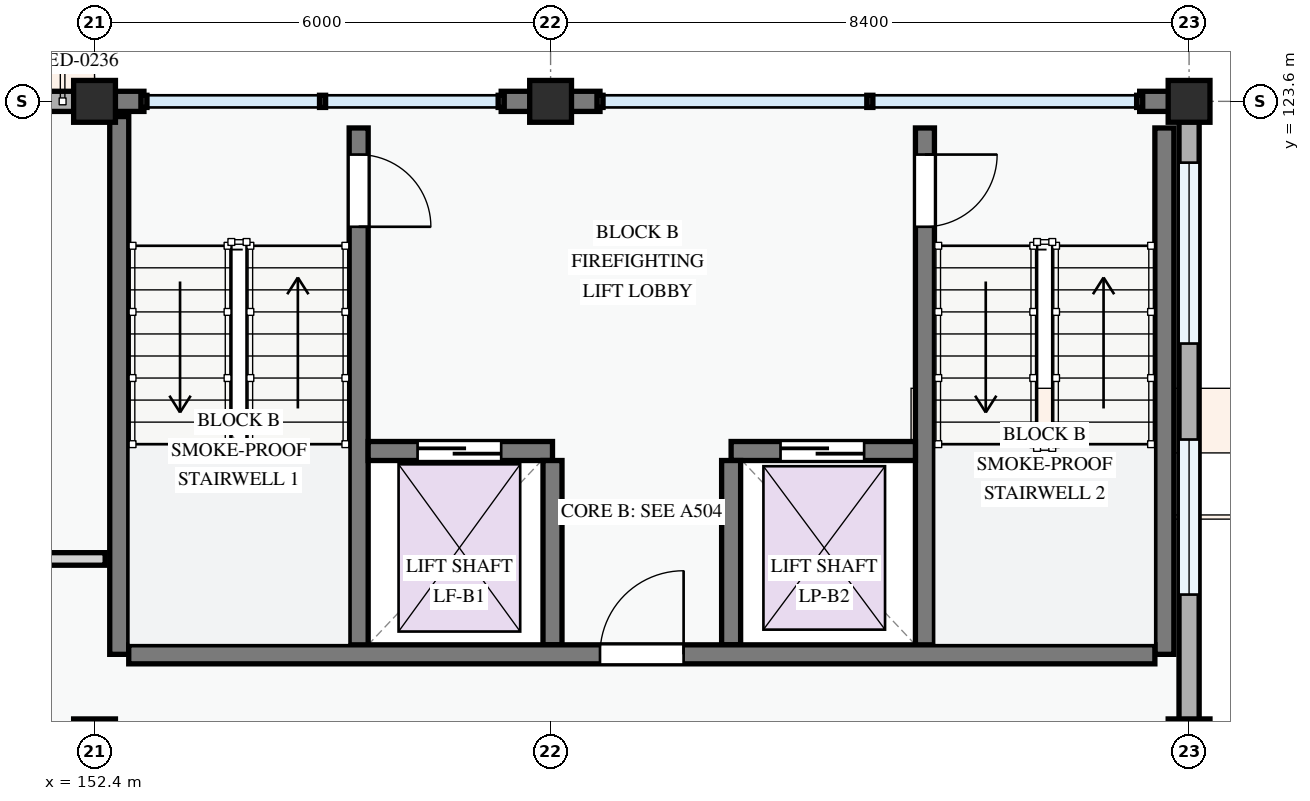
"""IFC4 building model, lengths in metres.
Left out: names, types, materials, properties, quantities, classifications, styles, units other than length and angle.
Written with IfcOpenShell. Run it as: python <this file> out.ifc"""

import sys

from ifc_helpers import new_model, si_unit, direction, frame, frame_2d, origin, origin_2d, place, context, subcontext, project, spatial, rectangle, extrude, element, fill, save


model = new_model("IFC4")
c1 = context("Model", 3, precision=1e-05, world=origin(), true_north=direction((0.0, 1.0)))
c2 = subcontext(c1, "Body", "Model", "MODEL_VIEW")
j1 = project(units=[si_unit("LENGTHUNIT", "METRE"), si_unit("PLANEANGLEUNIT", "RADIAN")], contexts=[c1])
p1 = place(None, origin())
s1 = spatial("IfcSite", under=j1, at=p1, CompositionType="ELEMENT")
p2 = place(p1, origin())
s2 = spatial("IfcBuilding", under=s1, at=p2, CompositionType="ELEMENT")
p3 = place(p2, frame((0.0, 0.0, 31.2)))
s3 = spatial("IfcBuildingStorey", under=s2, at=p3, CompositionType="ELEMENT", Elevation=31.2)
for number, where, z_axis, x_axis in (
    (1, (152.4, 115.2, 0.0), (0.0, 0.0, 1.0), (1.0, 0.0, 0.0)),
    (2, (152.4, 123.6, 0.0), (0.0, 0.0, 1.0), (1.0, 0.0, 0.0)),
    (3, (158.4, 123.6, 0.0), (0.0, 0.0, 1.0), (1.0, 0.0, 0.0)),
    (4, (166.8, 115.2, 0.0), (0.0, 0.0, 1.0), (1.0, 0.0, 0.0)),
    (5, (166.8, 123.6, 0.0), (0.0, 0.0, 1.0), (1.0, 0.0, 0.0)),
):
    element("IfcColumn", number, at=place(p3, frame(where, z_axis=z_axis, x_axis=x_axis)), inside=s3, PredefinedType="COLUMN", context=c2, shape_type="SweptSolid", body=[
        extrude(rectangle(XDim=0.55, YDim=0.55, at=origin_2d()), origin(), (0.0, 0.0, 1.0), 3.3),
    ])
p4 = place(p3, frame((166.8, 115.2, 0.0), z_axis=(0.0, 0.0, 1.0), x_axis=(0.0, 1.0, 0.0)))
e6 = element("IfcWall", 6, at=p4, inside=s3, PredefinedType="STANDARD", context=c2, shape_type="SweptSolid", body=[
    extrude(rectangle(XDim=8.4, YDim=0.265, at=frame_2d((4.2, 0.0))), origin(), (0.0, 0.0, 1.0), 2.425),
])
p5 = place(p4, frame((1.911, 0.0, 0.78)))
e7 = element("IfcOpeningElement", 7, at=p5, cuts=e6, PredefinedType="OPENING", context=c2, shape_type="SweptSolid", body=[
    extrude(rectangle(XDim=2.04, YDim=1.46, at=frame_2d((1.02, 0.73))), frame((0.0, 0.143, 0.0), z_axis=(0.0, -1.0, 0.0), x_axis=(1.0, 0.0, 0.0)), (0.0, 0.0, 1.0), 0.285),
])
p6 = place(p4, frame((5.214, 0.0, 0.78)))
e8 = element("IfcOpeningElement", 8, at=p6, cuts=e6, PredefinedType="OPENING", context=c2, shape_type="SweptSolid", body=[
    extrude(rectangle(XDim=2.38, YDim=1.48, at=frame_2d((1.19, 0.74))), frame((0.0, 0.143, 0.0), z_axis=(0.0, -1.0, 0.0), x_axis=(1.0, 0.0, 0.0)), (0.0, 0.0, 1.0), 0.285),
])
p7 = place(p3, frame((166.666, 123.6, 0.0), z_axis=(0.0, 0.0, 1.0), x_axis=(-1.0, 0.0, 0.0)))
e9 = element("IfcWall", 9, at=p7, inside=s3, PredefinedType="STANDARD", context=c2, shape_type="SweptSolid", body=[
    extrude(rectangle(XDim=0.516, YDim=0.265, at=frame_2d((0.258, 0.0))), origin(), (0.0, 0.0, 1.0), 3.04),
])
p8 = place(p3, frame((159.05, 123.6, 0.0), z_axis=(0.0, 0.0, 1.0), x_axis=(-1.0, 0.0, 0.0)))
e10 = element("IfcWall", 10, at=p8, inside=s3, PredefinedType="STANDARD", context=c2, shape_type="SweptSolid", body=[
    extrude(rectangle(XDim=0.65, YDim=0.265, at=frame_2d((0.325, 0.0))), origin(), (0.0, 0.0, 1.0), 3.04),
])
p9 = place(p3, frame((158.4, 123.6, 0.0), z_axis=(0.0, 0.0, 1.0), x_axis=(-1.0, 0.0, 0.0)))
e11 = element("IfcWall", 11, at=p9, inside=s3, PredefinedType="STANDARD", context=c2, shape_type="SweptSolid", body=[
    extrude(rectangle(XDim=0.65, YDim=0.265, at=frame_2d((0.325, 0.0))), origin(), (0.0, 0.0, 1.0), 3.04),
])
p10 = place(p3, frame((153.05, 123.6, 0.0), z_axis=(0.0, 0.0, 1.0), x_axis=(-1.0, 0.0, 0.0)))
e12 = element("IfcWall", 12, at=p10, inside=s3, PredefinedType="STANDARD", context=c2, shape_type="SweptSolid", body=[
    extrude(rectangle(XDim=0.65, YDim=0.265, at=frame_2d((0.325, 0.0))), origin(), (0.0, 0.0, 1.0), 3.04),
])
p11 = place(p3, frame((152.4, 123.6, 0.0), z_axis=(0.0, 0.0, 1.0), x_axis=(-1.0, 0.0, 0.0)))
e13 = element("IfcWall", 13, at=p11, inside=s3, PredefinedType="STANDARD", context=c2, shape_type="SweptSolid", body=[
    extrude(rectangle(XDim=8.4, YDim=0.265, at=frame_2d((4.2, 0.0))), origin(), (0.0, 0.0, 1.0), 2.375),
])
p12 = place(p11, frame((0.62, 0.0, 0.0)))
e14 = element("IfcOpeningElement", 14, at=p12, cuts=e13, PredefinedType="OPENING", context=c2, shape_type="SweptSolid", body=[
    extrude(rectangle(XDim=1.1, YDim=2.15, at=frame_2d((0.55, 1.075))), frame((0.0, 0.143, 0.0), z_axis=(0.0, -1.0, 0.0), x_axis=(1.0, 0.0, 0.0)), (0.0, 0.0, 1.0), 0.285),
])
p13 = place(p11, frame((2.175, 0.0, 0.78)))
e15 = element("IfcOpeningElement", 15, at=p13, cuts=e13, PredefinedType="OPENING", context=c2, shape_type="SweptSolid", body=[
    extrude(rectangle(XDim=2.48, YDim=1.46, at=frame_2d((1.24, 0.73))), frame((0.0, 0.143, 0.0), z_axis=(0.0, -1.0, 0.0), x_axis=(1.0, 0.0, 0.0)), (0.0, 0.0, 1.0), 0.285),
])
p14 = place(p11, frame((5.865, 0.0, 0.78)))
e16 = element("IfcOpeningElement", 16, at=p14, cuts=e13, PredefinedType="OPENING", context=c2, shape_type="SweptSolid", body=[
    extrude(rectangle(XDim=1.4, YDim=1.45, at=frame_2d((0.7, 0.725))), frame((0.0, 0.143, 0.0), z_axis=(0.0, -1.0, 0.0), x_axis=(1.0, 0.0, 0.0)), (0.0, 0.0, 1.0), 0.285),
])
p15 = place(p3, frame((155.875, 123.25, 0.0), z_axis=(0.0, 0.0, 1.0), x_axis=(0.0, -1.0, 0.0)))
e17 = element("IfcWall", 17, at=p15, inside=s3, PredefinedType="SHEAR", context=c2, shape_type="SweptSolid", body=[
    extrude(rectangle(XDim=6.925, YDim=0.25, at=frame_2d((3.462, 0.0))), origin(), (0.0, 0.0, 1.0), 3.0),
])
p16 = place(p15, frame((0.35, 0.0, 0.0)))
e18 = element("IfcOpeningElement", 18, at=p16, cuts=e17, PredefinedType="OPENING", context=c2, shape_type="SweptSolid", body=[
    extrude(rectangle(XDim=0.95, YDim=2.1, at=frame_2d((0.475, 1.05))), frame((0.0, 0.135, 0.0), z_axis=(0.0, -1.0, 0.0), x_axis=(1.0, 0.0, 0.0)), (0.0, 0.0, 1.0), 0.27),
])
p17 = place(p3, frame((152.725, 123.4, 0.0), z_axis=(0.0, 0.0, 1.0), x_axis=(0.0, -1.0, 0.0)))
e19 = element("IfcWall", 19, at=p17, inside=s3, PredefinedType="SHEAR", context=c2, shape_type="SweptSolid", body=[
    extrude(rectangle(XDim=7.075, YDim=0.25, at=frame_2d((3.538, 0.0))), origin(), (0.0, 0.0, 1.0), 3.0),
])
p18 = place(p3, frame((166.475, 123.25, 0.0), z_axis=(0.0, 0.0, 1.0), x_axis=(0.0, -1.0, 0.0)))
e20 = element("IfcWall", 20, at=p18, inside=s3, PredefinedType="SHEAR", context=c2, shape_type="SweptSolid", body=[
    extrude(rectangle(XDim=6.925, YDim=0.25, at=frame_2d((3.462, 0.0))), origin(), (0.0, 0.0, 1.0), 3.0),
])
p19 = place(p3, frame((163.325, 123.25, 0.0), z_axis=(0.0, 0.0, 1.0), x_axis=(0.0, -1.0, 0.0)))
e21 = element("IfcWall", 21, at=p19, inside=s3, PredefinedType="SHEAR", context=c2, shape_type="SweptSolid", body=[
    extrude(rectangle(XDim=6.925, YDim=0.25, at=frame_2d((3.462, 0.0))), origin(), (0.0, 0.0, 1.0), 3.0),
])
p20 = place(p19, frame((0.35, 0.0, 0.0)))
e22 = element("IfcOpeningElement", 22, at=p20, cuts=e21, PredefinedType="OPENING", context=c2, shape_type="SweptSolid", body=[
    extrude(rectangle(XDim=0.95, YDim=2.1, at=frame_2d((0.475, 1.05))), frame((0.0, 0.135, 0.0), z_axis=(0.0, -1.0, 0.0), x_axis=(1.0, 0.0, 0.0)), (0.0, 0.0, 1.0), 0.27),
])
p21 = place(p3, frame((156.0, 119.0, 0.0), z_axis=(0.0, 0.0, 1.0), x_axis=(1.0, 0.0, 0.0)))
e23 = element("IfcWall", 23, at=p21, inside=s3, PredefinedType="SHEAR", context=c2, shape_type="SweptSolid", body=[
    extrude(rectangle(XDim=2.425, YDim=0.25, at=frame_2d((1.212, 0.0))), origin(), (0.0, 0.0, 1.0), 3.0),
])
p22 = place(p21, frame((0.65, 0.0, 0.0)))
e24 = element("IfcOpeningElement", 24, at=p22, cuts=e23, PredefinedType="OPENING", context=c2, shape_type="SweptSolid", body=[
    extrude(rectangle(XDim=1.1, YDim=2.15, at=frame_2d((0.55, 1.075))), frame((0.0, 0.135, 0.0), z_axis=(0.0, -1.0, 0.0), x_axis=(1.0, 0.0, 0.0)), (0.0, 0.0, 1.0), 0.27),
])
p23 = place(p3, frame((160.775, 119.0, 0.0), z_axis=(0.0, 0.0, 1.0), x_axis=(1.0, 0.0, 0.0)))
e25 = element("IfcWall", 25, at=p23, inside=s3, PredefinedType="SHEAR", context=c2, shape_type="SweptSolid", body=[
    extrude(rectangle(XDim=2.425, YDim=0.25, at=frame_2d((1.212, 0.0))), origin(), (0.0, 0.0, 1.0), 3.0),
])
p24 = place(p23, frame((0.65, 0.0, 0.0)))
e26 = element("IfcOpeningElement", 26, at=p24, cuts=e25, PredefinedType="OPENING", context=c2, shape_type="SweptSolid", body=[
    extrude(rectangle(XDim=1.1, YDim=2.15, at=frame_2d((0.55, 1.075))), frame((0.0, 0.135, 0.0), z_axis=(0.0, -1.0, 0.0), x_axis=(1.0, 0.0, 0.0)), (0.0, 0.0, 1.0), 0.27),
])
for number, where, z_axis, x_axis in (
    (27, (158.425, 118.875, 0.0), (0.0, 0.0, 1.0), (0.0, -1.0, 0.0)),
    (28, (160.775, 118.875, 0.0), (0.0, 0.0, 1.0), (0.0, -1.0, 0.0)),
):
    element("IfcWall", number, at=place(p3, frame(where, z_axis=z_axis, x_axis=x_axis)), inside=s3, PredefinedType="SHEAR", context=c2, shape_type="SweptSolid", body=[
        extrude(rectangle(XDim=2.425, YDim=0.25, at=frame_2d((1.212, 0.0))), origin(), (0.0, 0.0, 1.0), 3.0),
    ])
p25 = place(p3, frame((152.85, 116.325, 0.0), z_axis=(0.0, 0.0, 1.0), x_axis=(1.0, 0.0, 0.0)))
e29 = element("IfcWall", 29, at=p25, inside=s3, PredefinedType="SHEAR", context=c2, shape_type="SweptSolid", body=[
    extrude(rectangle(XDim=13.5, YDim=0.25, at=frame_2d((6.75, 0.0))), origin(), (0.0, 0.0, 1.0), 3.0),
])
p26 = place(p25, frame((6.2, 0.0, 0.0)))
e30 = element("IfcOpeningElement", 30, at=p26, cuts=e29, PredefinedType="OPENING", context=c2, shape_type="SweptSolid", body=[
    extrude(rectangle(XDim=1.1, YDim=2.15, at=frame_2d((0.55, 1.075))), frame((0.0, 0.135, 0.0), z_axis=(0.0, -1.0, 0.0), x_axis=(1.0, 0.0, 0.0)), (0.0, 0.0, 1.0), 0.27),
])
p27 = place(p3, frame((80.534, 117.58, 0.0), z_axis=(0.0, 0.0, 1.0), x_axis=(1.0, 0.0, 0.0)))
e31 = element("IfcWall", 31, at=p27, inside=s3, PredefinedType="PARTITIONING", context=c2, shape_type="SweptSolid", body=[
    extrude(rectangle(XDim=72.006, YDim=0.165, at=frame_2d((36.003, 0.0))), origin(), (0.0, 0.0, 1.0), 3.0),
])
p28 = place(p27, frame((9.454, 0.0, 0.0)))
e32 = element("IfcOpeningElement", 32, at=p28, cuts=e31, PredefinedType="OPENING", context=c2, shape_type="SweptSolid", body=[
    extrude(rectangle(XDim=0.92, YDim=2.1, at=frame_2d((0.46, 1.05))), frame((0.0, 0.093, 0.0), z_axis=(0.0, -1.0, 0.0), x_axis=(1.0, 0.0, 0.0)), (0.0, 0.0, 1.0), 0.185),
])
p29 = place(p27, frame((23.835, 0.0, 0.0)))
e33 = element("IfcOpeningElement", 33, at=p29, cuts=e31, PredefinedType="OPENING", context=c2, shape_type="SweptSolid", body=[
    extrude(rectangle(XDim=0.92, YDim=2.1, at=frame_2d((0.46, 1.05))), frame((0.0, 0.093, 0.0), z_axis=(0.0, -1.0, 0.0), x_axis=(1.0, 0.0, 0.0)), (0.0, 0.0, 1.0), 0.185),
])
p30 = place(p27, frame((52.76, 0.0, 0.0)))
e34 = element("IfcOpeningElement", 34, at=p30, cuts=e31, PredefinedType="OPENING", context=c2, shape_type="SweptSolid", body=[
    extrude(rectangle(XDim=0.96, YDim=2.12, at=frame_2d((0.48, 1.06))), frame((0.0, 0.093, 0.0), z_axis=(0.0, -1.0, 0.0), x_axis=(1.0, 0.0, 0.0)), (0.0, 0.0, 1.0), 0.185),
])
p31 = place(p5, origin())
e35 = element("IfcWindow", 35, at=p31, inside=s3, PartitioningType="DOUBLE_PANEL_VERTICAL", PredefinedType="WINDOW", context=c2, shape_type="SweptSolid", body=[
    extrude(rectangle(XDim=2.04, YDim=1.46, at=frame_2d((1.02, 0.73))), frame((0.0, 0.03, 0.0), z_axis=(0.0, -1.0, 0.0), x_axis=(1.0, 0.0, 0.0)), (0.0, 0.0, 1.0), 0.06),
])
fill(e7, e35)
p32 = place(p6, origin())
e36 = element("IfcWindow", 36, at=p32, inside=s3, PartitioningType="DOUBLE_PANEL_VERTICAL", PredefinedType="WINDOW", context=c2, shape_type="SweptSolid", body=[
    extrude(rectangle(XDim=2.38, YDim=1.48, at=frame_2d((1.19, 0.74))), frame((0.0, 0.03, 0.0), z_axis=(0.0, -1.0, 0.0), x_axis=(1.0, 0.0, 0.0)), (0.0, 0.0, 1.0), 0.06),
])
fill(e8, e36)
p33 = place(p16, origin())
e37 = element("IfcDoor", 37, at=p33, inside=s3, OperationType="SINGLE_SWING_RIGHT", PredefinedType="DOOR", context=c2, shape_type="SweptSolid", body=[
    extrude(rectangle(XDim=0.95, YDim=2.1, at=frame_2d((0.475, 1.05))), frame((0.0, 0.025, 0.0), z_axis=(0.0, -1.0, 0.0), x_axis=(1.0, 0.0, 0.0)), (0.0, 0.0, 1.0), 0.05),
])
fill(e18, e37)
p34 = place(p20, origin())
e38 = element("IfcDoor", 38, at=p34, inside=s3, OperationType="SINGLE_SWING_LEFT", PredefinedType="DOOR", context=c2, shape_type="SweptSolid", body=[
    extrude(rectangle(XDim=0.95, YDim=2.1, at=frame_2d((0.475, 1.05))), frame((0.0, 0.025, 0.0), z_axis=(0.0, -1.0, 0.0), x_axis=(1.0, 0.0, 0.0)), (0.0, 0.0, 1.0), 0.05),
])
fill(e22, e38)
p35 = place(p22, origin())
e39 = element("IfcDoor", 39, at=p35, inside=s3, OperationType="SLIDING_TO_LEFT", PredefinedType="DOOR", context=c2, shape_type="SweptSolid", body=[
    extrude(rectangle(XDim=1.1, YDim=2.15, at=frame_2d((0.55, 1.075))), frame((0.0, 0.025, 0.0), z_axis=(0.0, -1.0, 0.0), x_axis=(1.0, 0.0, 0.0)), (0.0, 0.0, 1.0), 0.05),
])
fill(e24, e39)
p36 = place(p24, origin())
e40 = element("IfcDoor", 40, at=p36, inside=s3, OperationType="SLIDING_TO_LEFT", PredefinedType="DOOR", context=c2, shape_type="SweptSolid", body=[
    extrude(rectangle(XDim=1.1, YDim=2.15, at=frame_2d((0.55, 1.075))), frame((0.0, 0.025, 0.0), z_axis=(0.0, -1.0, 0.0), x_axis=(1.0, 0.0, 0.0)), (0.0, 0.0, 1.0), 0.05),
])
fill(e26, e40)
p37 = place(p26, origin())
e41 = element("IfcDoor", 41, at=p37, inside=s3, OperationType="SINGLE_SWING_RIGHT", PredefinedType="DOOR", context=c2, shape_type="SweptSolid", body=[
    extrude(rectangle(XDim=1.1, YDim=2.15, at=frame_2d((0.55, 1.075))), frame((0.0, 0.025, 0.0), z_axis=(0.0, -1.0, 0.0), x_axis=(1.0, 0.0, 0.0)), (0.0, 0.0, 1.0), 0.05),
])
fill(e30, e41)
save(model, sys.argv[1])
